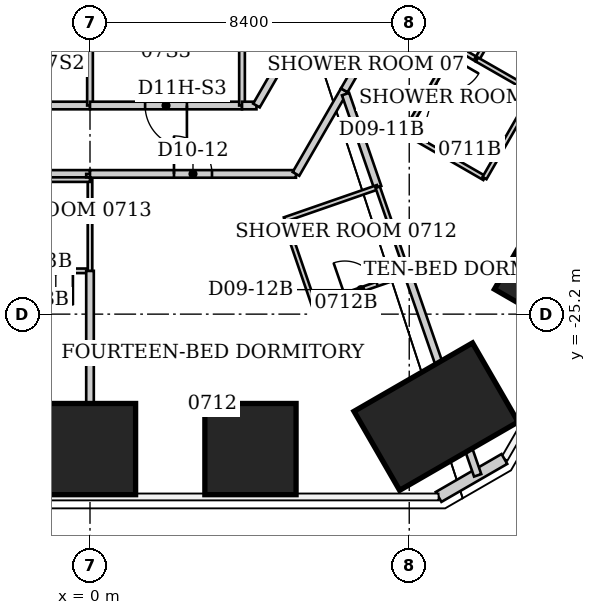
"""IFC4 building model, lengths in metres.
Left out: names, types, materials, properties, quantities, classifications, styles, units other than length and angle.
Written with IfcOpenShell. Run it as: python <this file> out.ifc"""

import sys

from ifc_helpers import new_model, si_unit, direction, frame, frame_2d, origin, origin_2d, place, context, subcontext, project, spatial, rectangle, extrude, element, fill, save


model = new_model("IFC4")
c1 = context("Model", 3, precision=1e-05, world=origin(), true_north=direction((0.0, 1.0)))
c2 = subcontext(c1, "Body", "Model", "MODEL_VIEW")
j1 = project(units=[si_unit("LENGTHUNIT", "METRE"), si_unit("PLANEANGLEUNIT", "RADIAN")], contexts=[c1])
p1 = place(None, origin())
s1 = spatial("IfcSite", under=j1, at=p1, CompositionType="ELEMENT")
p2 = place(p1, origin())
s2 = spatial("IfcBuilding", under=s1, at=p2, CompositionType="ELEMENT")
p3 = place(p2, frame((0.0, 0.0, 34.4)))
s3 = spatial("IfcBuildingStorey", under=s2, at=p3, CompositionType="ELEMENT", Elevation=34.4)
p4 = place(p3, frame((12.282, -24.105, 0.0), z_axis=(0.0, 0.0, 1.0), x_axis=(0.866025403784, -0.5, 0.0)))
e1 = element("IfcColumn", 1, at=p4, inside=s3, PredefinedType="COLUMN", context=c2, shape_type="SweptSolid", body=[
    extrude(rectangle(XDim=2.4, YDim=2.4, at=origin_2d()), origin(), (0.0, 0.0, 1.0), 3.8),
])
p5 = place(p3, frame((9.106, -27.897, 0.0), z_axis=(0.0, 0.0, 1.0), x_axis=(0.5, -0.866025403784, 0.0)))
e2 = element("IfcColumn", 2, at=p5, inside=s3, PredefinedType="COLUMN", context=c2, shape_type="SweptSolid", body=[
    extrude(rectangle(XDim=2.4, YDim=3.6, at=origin_2d()), origin(), (0.0, 0.0, 1.0), 3.8),
])
for number, where, z_axis, x_axis in (
    (3, (4.222, -28.751, 0.0), (0.0, 0.0, 1.0), (0.0, -1.0, 0.0)),
    (4, (0.0, -28.751, 0.0), (0.0, 0.0, 1.0), (0.0, -1.0, 0.0)),
):
    element("IfcColumn", number, at=place(p3, frame(where, z_axis=z_axis, x_axis=x_axis)), inside=s3, PredefinedType="COLUMN", context=c2, shape_type="SweptSolid", body=[
        extrude(rectangle(XDim=2.4, YDim=2.4, at=origin_2d()), origin(), (0.0, 0.0, 1.0), 3.8),
    ])
p6 = place(p3, frame((10.904, -29.011, 0.0), z_axis=(0.0, 0.0, 1.0), x_axis=(-0.866010750942, -0.50002537861, 0.0)))
e5 = element("IfcWall", 5, at=p6, inside=s3, PredefinedType="SOLIDWALL", context=c2, shape_type="SweptSolid", body=[
    extrude(rectangle(XDim=2.0, YDim=0.3, at=frame_2d((1.0, 0.0))), origin(), (0.0, 0.0, 1.0), 3.64),
])
p7 = place(p3, frame((-5.42, -21.51, 0.0), z_axis=(0.0, 0.0, 1.0), x_axis=(1.0, 0.0, 0.0)))
e6 = element("IfcWall", 6, at=p7, inside=s3, PredefinedType="PARTITIONING", context=c2, shape_type="SweptSolid", body=[
    extrude(rectangle(XDim=5.42, YDim=0.2, at=frame_2d((2.71, 0.0))), origin(), (0.0, 0.0, 1.0), 3.64),
])
p8 = place(p7, frame((1.71, 0.0, 0.0)))
e7 = element("IfcOpeningElement", 7, at=p8, cuts=e6, PredefinedType="OPENING", context=c2, shape_type="SweptSolid", body=[
    extrude(rectangle(XDim=1.0, YDim=2.13, at=frame_2d((0.5, 1.065))), frame((0.0, 0.1, 0.0), z_axis=(0.0, -1.0, 0.0), x_axis=(1.0, 0.0, 0.0)), (0.0, 0.0, 1.0), 0.2),
])
p9 = place(p3, frame((-2.6, -24.06, 0.0), z_axis=(0.0, 0.0, 1.0), x_axis=(1.0, 0.0, 0.0)))
e8 = element("IfcWall", 8, at=p9, inside=s3, PredefinedType="PARTITIONING", context=c2, shape_type="SweptSolid", body=[
    extrude(rectangle(XDim=2.6, YDim=0.12, at=frame_2d((1.3, 0.0))), origin(), (0.0, 0.0, 1.0), 3.64),
])
p10 = place(p9, frame((1.25, 0.0, 0.0)))
e9 = element("IfcOpeningElement", 9, at=p10, cuts=e8, PredefinedType="OPENING", context=c2, shape_type="SweptSolid", body=[
    extrude(rectangle(XDim=0.9, YDim=2.03, at=frame_2d((0.45, 1.015))), frame((0.0, 0.06, 0.0), z_axis=(0.0, -1.0, 0.0), x_axis=(1.0, 0.0, 0.0)), (0.0, 0.0, 1.0), 0.12),
])
p11 = place(p3, frame((0.0, -29.89, 0.0), z_axis=(0.0, 0.0, 1.0), x_axis=(0.0, 1.0, 0.0)))
e10 = element("IfcWall", 10, at=p11, inside=s3, PredefinedType="PARTITIONING", context=c2, shape_type="SweptSolid", body=[
    extrude(rectangle(XDim=5.83, YDim=0.2, at=frame_2d((2.915, 0.0))), origin(), (0.0, 0.0, 1.0), 2.86),
])
p12 = place(p3, frame((0.0, -24.06, 0.0), z_axis=(0.0, 0.0, 1.0), x_axis=(0.0, 1.0, 0.0)))
e11 = element("IfcWall", 11, at=p12, inside=s3, PredefinedType="PARTITIONING", context=c2, shape_type="SweptSolid", body=[
    extrude(rectangle(XDim=2.4, YDim=0.12, at=frame_2d((1.2, 0.0))), origin(), (0.0, 0.0, 1.0), 2.86),
])
p13 = place(p3, frame((0.0, -21.66, 0.0), z_axis=(0.0, 0.0, 1.0), x_axis=(-1.0, 0.0, 0.0)))
e12 = element("IfcWall", 12, at=p13, inside=s3, PredefinedType="PARTITIONING", context=c2, shape_type="SweptSolid", body=[
    extrude(rectangle(XDim=2.6, YDim=0.12, at=frame_2d((1.3, 0.0))), origin(), (0.0, 0.0, 1.0), 3.64),
])
p14 = place(p3, frame((0.0, -21.6, 0.0), z_axis=(0.0, 0.0, 1.0), x_axis=(0.0, 1.0, 0.0)))
e13 = element("IfcWall", 13, at=p14, inside=s3, PredefinedType="PARTITIONING", context=c2, shape_type="SweptSolid", body=[
    extrude(rectangle(XDim=0.09, YDim=0.2, at=frame_2d((0.045, 0.0))), origin(), (0.0, 0.0, 1.0), 3.64),
])
p15 = place(p3, frame((0.0, -21.51, 0.0), z_axis=(0.0, 0.0, 1.0), x_axis=(1.0, 0.0, 0.0)))
e14 = element("IfcWall", 14, at=p15, inside=s3, PredefinedType="PARTITIONING", context=c2, shape_type="SweptSolid", body=[
    extrude(rectangle(XDim=5.42, YDim=0.2, at=frame_2d((2.71, 0.0))), origin(), (0.0, 0.0, 1.0), 3.64),
])
p16 = place(p15, frame((2.21, 0.0, 0.0)))
e15 = element("IfcOpeningElement", 15, at=p16, cuts=e14, PredefinedType="OPENING", context=c2, shape_type="SweptSolid", body=[
    extrude(rectangle(XDim=1.0, YDim=2.13, at=frame_2d((0.5, 1.065))), frame((0.0, 0.1, 0.0), z_axis=(0.0, -1.0, 0.0), x_axis=(1.0, 0.0, 0.0)), (0.0, 0.0, 1.0), 0.2),
])
p17 = place(p3, frame((0.0, -19.71, 0.0), z_axis=(0.0, 0.0, 1.0), x_axis=(-1.0, 0.0, 0.0)))
e16 = element("IfcWall", 16, at=p17, inside=s3, PredefinedType="PARTITIONING", context=c2, shape_type="SweptSolid", body=[
    extrude(rectangle(XDim=4.0, YDim=0.2, at=frame_2d((2.0, 0.0))), origin(), (0.0, 0.0, 1.0), 3.64),
])
p18 = place(p3, frame((0.0, -13.95, 0.0), z_axis=(0.0, 0.0, 1.0), x_axis=(0.0, -1.0, 0.0)))
e17 = element("IfcWall", 17, at=p18, inside=s3, PredefinedType="PARTITIONING", context=c2, shape_type="SweptSolid", body=[
    extrude(rectangle(XDim=5.76, YDim=0.15, at=frame_2d((2.88, 0.0))), origin(), (0.0, 0.0, 1.0), 2.86),
])
p19 = place(p3, frame((4.0, -19.71, 0.0), z_axis=(0.0, 0.0, 1.0), x_axis=(-1.0, 0.0, 0.0)))
e18 = element("IfcWall", 18, at=p19, inside=s3, PredefinedType="PARTITIONING", context=c2, shape_type="SweptSolid", body=[
    extrude(rectangle(XDim=4.0, YDim=0.2, at=frame_2d((2.0, 0.0))), origin(), (0.0, 0.0, 1.0), 3.64),
])
p20 = place(p19, frame((1.45, 0.0, 0.0)))
e19 = element("IfcOpeningElement", 19, at=p20, cuts=e18, PredefinedType="OPENING", context=c2, shape_type="SweptSolid", body=[
    extrude(rectangle(XDim=1.1, YDim=2.2, at=frame_2d((0.55, 1.1))), frame((0.0, 0.1, 0.0), z_axis=(0.0, -1.0, 0.0), x_axis=(1.0, 0.0, 0.0)), (0.0, 0.0, 1.0), 0.2),
])
p21 = place(p3, frame((4.0, -13.95, 0.0), z_axis=(0.0, 0.0, 1.0), x_axis=(0.0, -1.0, 0.0)))
e20 = element("IfcWall", 20, at=p21, inside=s3, PredefinedType="PARTITIONING", context=c2, shape_type="SweptSolid", body=[
    extrude(rectangle(XDim=5.76, YDim=0.15, at=frame_2d((2.88, 0.0))), origin(), (0.0, 0.0, 1.0), 3.64),
])
p22 = place(p3, frame((4.38, -19.71, 0.0), z_axis=(0.0, 0.0, 1.0), x_axis=(-1.0, 0.0, 0.0)))
e21 = element("IfcWall", 21, at=p22, inside=s3, PredefinedType="PARTITIONING", context=c2, shape_type="SweptSolid", body=[
    extrude(rectangle(XDim=0.38, YDim=0.2, at=frame_2d((0.19, 0.0))), origin(), (0.0, 0.0, 1.0), 3.64),
])
p23 = place(p3, frame((5.12, -22.71, 0.0), z_axis=(0.0, 0.0, 1.0), x_axis=(0.324880771143, -0.945754981241, 0.0)))
e22 = element("IfcWall", 22, at=p23, inside=s3, PredefinedType="PARTITIONING", context=c2, shape_type="SweptSolid", body=[
    extrude(rectangle(XDim=2.4, YDim=0.12, at=frame_2d((1.2, 0.0))), origin(), (0.0, 0.0, 1.0), 3.64),
])
p24 = place(p3, frame((5.42, -21.51, 0.0), z_axis=(0.0, 0.0, 1.0), x_axis=(0.499963722229, 0.866046347752, 0.0)))
e23 = element("IfcWall", 23, at=p24, inside=s3, PredefinedType="PARTITIONING", context=c2, shape_type="SweptSolid", body=[
    extrude(rectangle(XDim=2.54, YDim=0.2, at=frame_2d((1.27, 0.0))), origin(), (0.0, 0.0, 1.0), 3.64),
])
p25 = place(p3, frame((5.9, -24.98, 0.0), z_axis=(0.0, 0.0, 1.0), x_axis=(0.945165466094, 0.326591857987, 0.0)))
e24 = element("IfcWall", 24, at=p25, inside=s3, PredefinedType="PARTITIONING", context=c2, shape_type="SweptSolid", body=[
    extrude(rectangle(XDim=2.603, YDim=0.12, at=frame_2d((1.302, 0.0))), origin(), (0.0, 0.0, 1.0), 3.64),
])
p26 = place(p25, frame((0.85, 0.0, 0.0)))
e25 = element("IfcOpeningElement", 25, at=p26, cuts=e24, PredefinedType="OPENING", context=c2, shape_type="SweptSolid", body=[
    extrude(rectangle(XDim=0.9, YDim=2.03, at=frame_2d((0.45, 1.015))), frame((0.0, 0.06, 0.0), z_axis=(0.0, -1.0, 0.0), x_axis=(1.0, 0.0, 0.0)), (0.0, 0.0, 1.0), 0.12),
])
p27 = place(p3, frame((6.69, -19.31, 0.0), z_axis=(0.0, 0.0, 1.0), x_axis=(0.498748634132, 0.866746675766, 0.0)))
e26 = element("IfcWall", 26, at=p27, inside=s3, PredefinedType="PARTITIONING", context=c2, shape_type="SweptSolid", body=[
    extrude(rectangle(XDim=2.446, YDim=0.2, at=frame_2d((1.223, 0.0))), origin(), (0.0, 0.0, 1.0), 3.64),
])
p28 = place(p27, frame((0.723, 0.0, 0.0)))
e27 = element("IfcOpeningElement", 27, at=p28, cuts=e26, PredefinedType="OPENING", context=c2, shape_type="SweptSolid", body=[
    extrude(rectangle(XDim=1.0, YDim=2.13, at=frame_2d((0.5, 1.065))), frame((0.0, 0.1, 0.0), z_axis=(0.0, -1.0, 0.0), x_axis=(1.0, 0.0, 0.0)), (0.0, 0.0, 1.0), 0.2),
])
p29 = place(p3, frame((6.724, -19.409, 0.0), z_axis=(0.0, 0.0, 1.0), x_axis=(0.326182205696, -0.945306917719, 0.0)))
e28 = element("IfcWall", 28, at=p29, inside=s3, PredefinedType="PARTITIONING", context=c2, shape_type="SweptSolid", body=[
    extrude(rectangle(XDim=2.593, YDim=0.2, at=frame_2d((1.296, 0.0))), origin(), (0.0, 0.0, 1.0), 3.64),
])
p30 = place(p3, frame((7.57, -21.86, 0.0), z_axis=(0.0, 0.0, 1.0), x_axis=(-0.944782191137, -0.327698964463, 0.0)))
e29 = element("IfcWall", 29, at=p30, inside=s3, PredefinedType="PARTITIONING", context=c2, shape_type="SweptSolid", body=[
    extrude(rectangle(XDim=2.594, YDim=0.12, at=frame_2d((1.297, 0.0))), origin(), (0.0, 0.0, 1.0), 3.64),
])
p31 = place(p3, frame((7.57, -21.86, 0.0), z_axis=(0.0, 0.0, 1.0), x_axis=(0.327706459026, -0.944779591605, 0.0)))
e30 = element("IfcWall", 30, at=p31, inside=s3, PredefinedType="PARTITIONING", context=c2, shape_type="SweptSolid", body=[
    extrude(rectangle(XDim=2.35, YDim=0.12, at=frame_2d((1.175, 0.0))), origin(), (0.0, 0.0, 1.0), 3.64),
])
p32 = place(p3, frame((7.71, -13.95, 0.0), z_axis=(0.0, 0.0, 1.0), x_axis=(-0.500511113963, -0.865730110831, 0.0)))
e31 = element("IfcWall", 31, at=p32, inside=s3, PredefinedType="PARTITIONING", context=c2, shape_type="SweptSolid", body=[
    extrude(rectangle(XDim=6.653, YDim=0.2, at=frame_2d((3.327, 0.0))), origin(), (0.0, 0.0, 1.0), 3.64),
])
p33 = place(p32, frame((2.777, 0.0, 0.0)))
e32 = element("IfcOpeningElement", 32, at=p33, cuts=e31, PredefinedType="OPENING", context=c2, shape_type="SweptSolid", body=[
    extrude(rectangle(XDim=1.1, YDim=2.2, at=frame_2d((0.55, 1.1))), frame((0.0, 0.1, 0.0), z_axis=(0.0, -1.0, 0.0), x_axis=(1.0, 0.0, 0.0)), (0.0, 0.0, 1.0), 0.2),
])
p34 = place(p3, frame((8.3, -20.42, 0.0), z_axis=(0.0, 0.0, 1.0), x_axis=(0.866177122335, -0.499737123639, 0.0)))
e33 = element("IfcWall", 33, at=p34, inside=s3, PredefinedType="PARTITIONING", context=c2, shape_type="SweptSolid", body=[
    extrude(rectangle(XDim=2.401, YDim=0.12, at=frame_2d((1.201, 0.0))), origin(), (0.0, 0.0, 1.0), 3.64),
])
p35 = place(p3, frame((8.36, -24.13, 0.0), z_axis=(0.0, 0.0, 1.0), x_axis=(0.327332811485, -0.944909112309, 0.0)))
e34 = element("IfcWall", 34, at=p35, inside=s3, PredefinedType="PARTITIONING", context=c2, shape_type="SweptSolid", body=[
    extrude(rectangle(XDim=5.621, YDim=0.2, at=frame_2d((2.811, 0.0))), origin(), (0.0, 0.0, 1.0), 3.64),
])
p36 = place(p3, frame((9.6, -18.16, 0.0), z_axis=(0.0, 0.0, 1.0), x_axis=(-0.498627694264, -0.866816256489, 0.0)))
e35 = element("IfcWall", 35, at=p36, inside=s3, PredefinedType="PARTITIONING", context=c2, shape_type="SweptSolid", body=[
    extrude(rectangle(XDim=2.607, YDim=0.12, at=frame_2d((1.304, 0.0))), origin(), (0.0, 0.0, 1.0), 3.64),
])
p37 = place(p36, frame((0.3, 0.0, 0.0)))
e36 = element("IfcOpeningElement", 36, at=p37, cuts=e35, PredefinedType="OPENING", context=c2, shape_type="SweptSolid", body=[
    extrude(rectangle(XDim=0.9, YDim=2.03, at=frame_2d((0.45, 1.015))), frame((0.0, 0.06, 0.0), z_axis=(0.0, -1.0, 0.0), x_axis=(1.0, 0.0, 0.0)), (0.0, 0.0, 1.0), 0.12),
])
p38 = place(p3, frame((9.6, -18.16, 0.0), z_axis=(0.0, 0.0, 1.0), x_axis=(0.862577739272, -0.505924543497, 0.0)))
e37 = element("IfcWall", 37, at=p38, inside=s3, PredefinedType="PARTITIONING", context=c2, shape_type="SweptSolid", body=[
    extrude(rectangle(XDim=0.672, YDim=0.12, at=frame_2d((0.336, 0.0))), origin(), (0.0, 0.0, 1.0), 3.64),
])
p39 = place(p3, frame((10.18, -18.5, 0.0), z_axis=(0.0, 0.0, 1.0), x_axis=(0.499693115345, 0.866202511239, 0.0)))
e38 = element("IfcWall", 38, at=p39, inside=s3, PredefinedType="PARTITIONING", context=c2, shape_type="SweptSolid", body=[
    extrude(rectangle(XDim=2.401, YDim=0.12, at=frame_2d((1.201, 0.0))), origin(), (0.0, 0.0, 1.0), 3.64),
])
p40 = place(p3, frame((10.18, -18.5, 0.0), z_axis=(0.0, 0.0, 1.0), x_axis=(0.867564547129, -0.497324598794, 0.0)))
e39 = element("IfcWall", 39, at=p40, inside=s3, PredefinedType="PARTITIONING", context=c2, shape_type="SweptSolid", body=[
    extrude(rectangle(XDim=1.729, YDim=0.12, at=frame_2d((0.865, 0.0))), origin(), (0.0, 0.0, 1.0), 3.64),
])
p41 = place(p3, frame((10.38, -21.62, 0.0), z_axis=(0.0, 0.0, 1.0), x_axis=(0.498627694264, 0.866816256489, 0.0)))
e40 = element("IfcWall", 40, at=p41, inside=s3, PredefinedType="PARTITIONING", context=c2, shape_type="SweptSolid", body=[
    extrude(rectangle(XDim=2.607, YDim=0.12, at=frame_2d((1.304, 0.0))), origin(), (0.0, 0.0, 1.0), 3.64),
])
p42 = place(p28, origin())
e41 = element("IfcDoor", 41, at=p42, inside=s3, OperationType="SINGLE_SWING_LEFT", PredefinedType="DOOR", context=c2, shape_type="SweptSolid", body=[
    extrude(rectangle(XDim=1.0, YDim=2.13, at=frame_2d((0.5, 1.065))), frame((0.0, 0.025, 0.0), z_axis=(0.0, -1.0, 0.0), x_axis=(1.0, 0.0, 0.0)), (0.0, 0.0, 1.0), 0.05),
])
fill(e27, e41)
p43 = place(p37, origin())
e42 = element("IfcDoor", 42, at=p43, inside=s3, OperationType="SINGLE_SWING_LEFT", PredefinedType="DOOR", context=c2, shape_type="SweptSolid", body=[
    extrude(rectangle(XDim=0.9, YDim=2.03, at=frame_2d((0.45, 1.015))), frame((0.0, 0.025, 0.0), z_axis=(0.0, -1.0, 0.0), x_axis=(1.0, 0.0, 0.0)), (0.0, 0.0, 1.0), 0.05),
])
fill(e36, e42)
p44 = place(p16, origin())
e43 = element("IfcDoor", 43, at=p44, inside=s3, OperationType="SINGLE_SWING_LEFT", PredefinedType="DOOR", context=c2, shape_type="SweptSolid", body=[
    extrude(rectangle(XDim=1.0, YDim=2.13, at=frame_2d((0.5, 1.065))), frame((0.0, 0.025, 0.0), z_axis=(0.0, -1.0, 0.0), x_axis=(1.0, 0.0, 0.0)), (0.0, 0.0, 1.0), 0.05),
])
fill(e15, e43)
p45 = place(p26, origin())
e44 = element("IfcDoor", 44, at=p45, inside=s3, OperationType="SINGLE_SWING_LEFT", PredefinedType="DOOR", context=c2, shape_type="SweptSolid", body=[
    extrude(rectangle(XDim=0.9, YDim=2.03, at=frame_2d((0.45, 1.015))), frame((0.0, 0.025, 0.0), z_axis=(0.0, -1.0, 0.0), x_axis=(1.0, 0.0, 0.0)), (0.0, 0.0, 1.0), 0.05),
])
fill(e25, e44)
p46 = place(p10, origin())
e45 = element("IfcDoor", 45, at=p46, inside=s3, OperationType="SINGLE_SWING_RIGHT", PredefinedType="DOOR", context=c2, shape_type="SweptSolid", body=[
    extrude(rectangle(XDim=0.9, YDim=2.03, at=frame_2d((0.45, 1.015))), frame((0.0, 0.025, 0.0), z_axis=(0.0, -1.0, 0.0), x_axis=(1.0, 0.0, 0.0)), (0.0, 0.0, 1.0), 0.05),
])
fill(e9, e45)
p47 = place(p20, origin())
e46 = element("IfcDoor", 46, at=p47, inside=s3, OperationType="SINGLE_SWING_LEFT", PredefinedType="DOOR", context=c2, shape_type="SweptSolid", body=[
    extrude(rectangle(XDim=1.1, YDim=2.2, at=frame_2d((0.55, 1.1))), frame((0.0, 0.025, 0.0), z_axis=(0.0, -1.0, 0.0), x_axis=(1.0, 0.0, 0.0)), (0.0, 0.0, 1.0), 0.05),
])
fill(e19, e46)
save(model, sys.argv[1])
